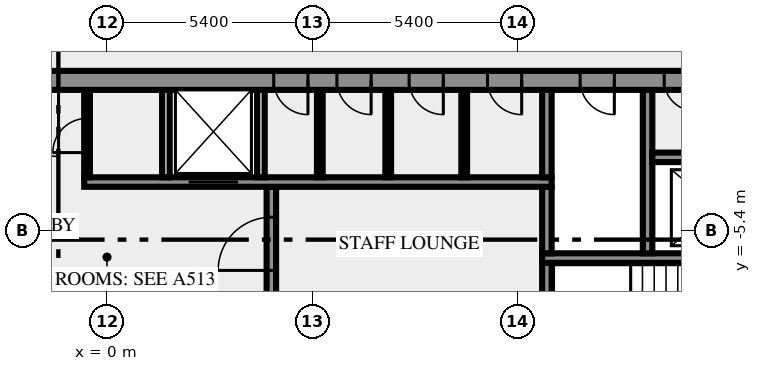
"""IFC4 building model, lengths in metres.
Left out: names, types, materials, properties, quantities, classifications, styles, units other than length and angle.
Written with IfcOpenShell. Run it as: python <this file> out.ifc"""

import sys

from ifc_helpers import new_model, si_unit, direction, frame, frame_2d, origin, place, context, subcontext, project, spatial, rectangle, extrude, element, fill, save


model = new_model("IFC4")
c1 = context("Model", 3, precision=1e-05, world=origin(), true_north=direction((0.0, 1.0)))
c2 = subcontext(c1, "Body", "Model", "MODEL_VIEW")
j1 = project(units=[si_unit("LENGTHUNIT", "METRE"), si_unit("PLANEANGLEUNIT", "RADIAN")], contexts=[c1])
p1 = place(None, origin())
s1 = spatial("IfcSite", under=j1, at=p1, CompositionType="ELEMENT")
p2 = place(p1, origin())
s2 = spatial("IfcBuilding", under=s1, at=p2, CompositionType="ELEMENT")
p3 = place(p2, frame((0.0, 0.0, 289.0)))
s3 = spatial("IfcBuildingStorey", under=s2, at=p3, CompositionType="ELEMENT", Elevation=289.0)
p4 = place(p3, frame((4.325, -7.25, 0.0), z_axis=(0.0, 0.0, 1.0), x_axis=(0.0, 1.0, 0.0)))
e1 = element("IfcWall", 1, at=p4, inside=s3, PredefinedType="SHEAR", context=c2, shape_type="SweptSolid", body=[
    extrude(rectangle(XDim=3.0, YDim=0.25, at=frame_2d((1.5, 0.0))), origin(), (0.0, 0.0, 1.0), 3.65),
])
p5 = place(p4, frame((0.8, 0.0, 0.0)))
e2 = element("IfcOpeningElement", 2, at=p5, cuts=e1, PredefinedType="OPENING", context=c2, shape_type="SweptSolid", body=[
    extrude(rectangle(XDim=1.4, YDim=2.1, at=frame_2d((0.7, 1.05))), frame((0.0, 0.135, 0.0), z_axis=(0.0, -1.0, 0.0), x_axis=(1.0, 0.0, 0.0)), (0.0, 0.0, 1.0), 0.27),
])
p6 = place(p3, frame((11.575, -7.25, 0.0), z_axis=(0.0, 0.0, 1.0), x_axis=(0.0, 1.0, 0.0)))
e3 = element("IfcWall", 3, at=p6, inside=s3, PredefinedType="SHEAR", context=c2, shape_type="SweptSolid", body=[
    extrude(rectangle(XDim=1.0, YDim=0.25, at=frame_2d((0.5, 0.0))), origin(), (0.0, 0.0, 1.0), 3.65),
])
p7 = place(p3, frame((19.5, -6.125, 0.0), z_axis=(0.0, 0.0, 1.0), x_axis=(-1.0, 0.0, 0.0)))
e4 = element("IfcWall", 4, at=p7, inside=s3, PredefinedType="SHEAR", context=c2, shape_type="SweptSolid", body=[
    extrude(rectangle(XDim=8.05, YDim=0.25, at=frame_2d((4.025, 0.0))), origin(), (0.0, 0.0, 1.0), 3.65),
])
p8 = place(p7, frame((0.05, 0.0, 0.0)))
e5 = element("IfcOpeningElement", 5, at=p8, cuts=e4, PredefinedType="OPENING", context=c2, shape_type="SweptSolid", body=[
    extrude(rectangle(XDim=1.8, YDim=2.1, at=frame_2d((0.9, 1.05))), frame((0.0, 0.135, 0.0), z_axis=(0.0, -1.0, 0.0), x_axis=(1.0, 0.0, 0.0)), (0.0, 0.0, 1.0), 0.27),
])
p9 = place(p3, frame((11.575, -6.0, 0.0), z_axis=(0.0, 0.0, 1.0), x_axis=(0.0, 1.0, 0.0)))
e6 = element("IfcWall", 6, at=p9, inside=s3, PredefinedType="SHEAR", context=c2, shape_type="SweptSolid", body=[
    extrude(rectangle(XDim=1.75, YDim=0.25, at=frame_2d((0.875, 0.0))), origin(), (0.0, 0.0, 1.0), 3.65),
])
p10 = place(p3, frame((14.225, -6.0, 0.0), z_axis=(0.0, 0.0, 1.0), x_axis=(0.0, 1.0, 0.0)))
e7 = element("IfcWall", 7, at=p10, inside=s3, PredefinedType="SHEAR", context=c2, shape_type="SweptSolid", body=[
    extrude(rectangle(XDim=4.3, YDim=0.25, at=frame_2d((2.15, 0.0))), origin(), (0.0, 0.0, 1.0), 3.65),
])
p11 = place(p3, frame((-0.6, -4.125, 0.0), z_axis=(0.0, 0.0, 1.0), x_axis=(1.0, 0.0, 0.0)))
e8 = element("IfcWall", 8, at=p11, inside=s3, PredefinedType="SHEAR", context=c2, shape_type="SweptSolid", body=[
    extrude(rectangle(XDim=12.3, YDim=0.25, at=frame_2d((6.15, 0.0))), origin(), (0.0, 0.0, 1.0), 3.65),
])
p12 = place(p11, frame((2.75, 0.0, 0.0)))
e9 = element("IfcOpeningElement", 9, at=p12, cuts=e8, PredefinedType="OPENING", context=c2, shape_type="SweptSolid", body=[
    extrude(rectangle(XDim=1.3, YDim=2.1, at=frame_2d((0.65, 1.05))), frame((0.0, 0.135, 0.0), z_axis=(0.0, -1.0, 0.0), x_axis=(1.0, 0.0, 0.0)), (0.0, 0.0, 1.0), 0.27),
])
p13 = place(p3, frame((-0.525, -4.0, 0.0), z_axis=(0.0, 0.0, 1.0), x_axis=(0.0, 1.0, 0.0)))
e10 = element("IfcWall", 10, at=p13, inside=s3, PredefinedType="PARTITIONING", context=c2, shape_type="SweptSolid", body=[
    extrude(rectangle(XDim=2.3, YDim=0.15, at=frame_2d((1.15, 0.0))), origin(), (0.0, 0.0, 1.0), 3.65),
])
p14 = place(p13, frame((0.65, 0.0, 0.0)))
e11 = element("IfcOpeningElement", 11, at=p14, cuts=e10, PredefinedType="OPENING", context=c2, shape_type="SweptSolid", body=[
    extrude(rectangle(XDim=0.9, YDim=2.1, at=frame_2d((0.45, 1.05))), frame((0.0, 0.085, 0.0), z_axis=(0.0, -1.0, 0.0), x_axis=(1.0, 0.0, 0.0)), (0.0, 0.0, 1.0), 0.17),
])
for number, where, z_axis, x_axis in (
    (12, (1.55, -4.0, 0.0), (0.0, 0.0, 1.0), (0.0, 1.0, 0.0)),
    (13, (4.05, -4.0, 0.0), (0.0, 0.0, 1.0), (0.0, 1.0, 0.0)),
):
    element("IfcWall", number, at=place(p3, frame(where, z_axis=z_axis, x_axis=x_axis)), inside=s3, PredefinedType="SOLIDWALL", context=c2, shape_type="SweptSolid", body=[
        extrude(rectangle(XDim=2.3, YDim=0.2, at=frame_2d((1.15, 0.0))), origin(), (0.0, 0.0, 1.0), 3.65),
    ])
for number, where, z_axis, x_axis in (
    (14, (5.6, -4.0, 0.0), (0.0, 0.0, 1.0), (0.0, 1.0, 0.0)),
    (15, (7.4, -4.0, 0.0), (0.0, 0.0, 1.0), (0.0, 1.0, 0.0)),
    (16, (9.4, -4.0, 0.0), (0.0, 0.0, 1.0), (0.0, 1.0, 0.0)),
):
    element("IfcWall", number, at=place(p3, frame(where, z_axis=z_axis, x_axis=x_axis)), inside=s3, PredefinedType="PARTITIONING", context=c2, shape_type="SweptSolid", body=[
        extrude(rectangle(XDim=2.3, YDim=0.15, at=frame_2d((1.15, 0.0))), origin(), (0.0, 0.0, 1.0), 3.65),
    ])
p15 = place(p3, frame((11.575, -4.0, 0.0), z_axis=(0.0, 0.0, 1.0), x_axis=(0.0, 1.0, 0.0)))
e17 = element("IfcWall", 17, at=p15, inside=s3, PredefinedType="SHEAR", context=c2, shape_type="SweptSolid", body=[
    extrude(rectangle(XDim=2.3, YDim=0.25, at=frame_2d((1.15, 0.0))), origin(), (0.0, 0.0, 1.0), 3.65),
])
p16 = place(p3, frame((14.35, -3.475, 0.0), z_axis=(0.0, 0.0, 1.0), x_axis=(1.0, 0.0, 0.0)))
e18 = element("IfcWall", 18, at=p16, inside=s3, PredefinedType="SHEAR", context=c2, shape_type="SweptSolid", body=[
    extrude(rectangle(XDim=3.0, YDim=0.25, at=frame_2d((1.5, 0.0))), origin(), (0.0, 0.0, 1.0), 3.65),
])
p17 = place(p3, frame((20.49, -1.45, 0.0), z_axis=(0.0, 0.0, 1.0), x_axis=(-1.0, 0.0, 0.0)))
e19 = element("IfcWall", 19, at=p17, inside=s3, PredefinedType="SHEAR", context=c2, shape_type="SweptSolid", body=[
    extrude(rectangle(XDim=40.98, YDim=0.5, at=frame_2d((20.49, 0.0))), origin(), (0.0, 0.0, 1.0), 3.65),
])
p18 = place(p17, frame((38.14, 0.0, 0.0)))
e20 = element("IfcOpeningElement", 20, at=p18, cuts=e19, PredefinedType="OPENING", context=c2, shape_type="SweptSolid", body=[
    extrude(rectangle(XDim=1.8, YDim=2.1, at=frame_2d((0.9, 1.05))), frame((0.0, 0.26, 0.0), z_axis=(0.0, -1.0, 0.0), x_axis=(1.0, 0.0, 0.0)), (0.0, 0.0, 1.0), 0.52),
])
p19 = place(p17, frame((35.89, 0.0, 0.0)))
e21 = element("IfcOpeningElement", 21, at=p19, cuts=e19, PredefinedType="OPENING", context=c2, shape_type="SweptSolid", body=[
    extrude(rectangle(XDim=0.9, YDim=2.1, at=frame_2d((0.45, 1.05))), frame((0.0, 0.26, 0.0), z_axis=(0.0, -1.0, 0.0), x_axis=(1.0, 0.0, 0.0)), (0.0, 0.0, 1.0), 0.52),
])
p20 = place(p17, frame((32.94, 0.0, 0.0)))
e22 = element("IfcOpeningElement", 22, at=p20, cuts=e19, PredefinedType="OPENING", context=c2, shape_type="SweptSolid", body=[
    extrude(rectangle(XDim=0.9, YDim=2.1, at=frame_2d((0.45, 1.05))), frame((0.0, 0.26, 0.0), z_axis=(0.0, -1.0, 0.0), x_axis=(1.0, 0.0, 0.0)), (0.0, 0.0, 1.0), 0.52),
])
p21 = place(p17, frame((31.015, 0.0, 0.0)))
e23 = element("IfcOpeningElement", 23, at=p21, cuts=e19, PredefinedType="OPENING", context=c2, shape_type="SweptSolid", body=[
    extrude(rectangle(XDim=0.8, YDim=2.1, at=frame_2d((0.4, 1.05))), frame((0.0, 0.26, 0.0), z_axis=(0.0, -1.0, 0.0), x_axis=(1.0, 0.0, 0.0)), (0.0, 0.0, 1.0), 0.52),
])
p22 = place(p17, frame((24.765, 0.0, 0.0)))
e24 = element("IfcOpeningElement", 24, at=p22, cuts=e19, PredefinedType="OPENING", context=c2, shape_type="SweptSolid", body=[
    extrude(rectangle(XDim=0.8, YDim=2.1, at=frame_2d((0.4, 1.05))), frame((0.0, 0.26, 0.0), z_axis=(0.0, -1.0, 0.0), x_axis=(1.0, 0.0, 0.0)), (0.0, 0.0, 1.0), 0.52),
])
p23 = place(p17, frame((21.765, 0.0, 0.0)))
e25 = element("IfcOpeningElement", 25, at=p23, cuts=e19, PredefinedType="OPENING", context=c2, shape_type="SweptSolid", body=[
    extrude(rectangle(XDim=2.0, YDim=2.1, at=frame_2d((1.0, 1.05))), frame((0.0, 0.26, 0.0), z_axis=(0.0, -1.0, 0.0), x_axis=(1.0, 0.0, 0.0)), (0.0, 0.0, 1.0), 0.52),
])
p24 = place(p17, frame((15.202, 0.0, 0.0)))
e26 = element("IfcOpeningElement", 26, at=p24, cuts=e19, PredefinedType="OPENING", context=c2, shape_type="SweptSolid", body=[
    extrude(rectangle(XDim=0.9, YDim=2.1, at=frame_2d((0.45, 1.05))), frame((0.0, 0.26, 0.0), z_axis=(0.0, -1.0, 0.0), x_axis=(1.0, 0.0, 0.0)), (0.0, 0.0, 1.0), 0.52),
])
p25 = place(p17, frame((13.54, 0.0, 0.0)))
e27 = element("IfcOpeningElement", 27, at=p25, cuts=e19, PredefinedType="OPENING", context=c2, shape_type="SweptSolid", body=[
    extrude(rectangle(XDim=0.9, YDim=2.1, at=frame_2d((0.45, 1.05))), frame((0.0, 0.26, 0.0), z_axis=(0.0, -1.0, 0.0), x_axis=(1.0, 0.0, 0.0)), (0.0, 0.0, 1.0), 0.52),
])
p26 = place(p17, frame((11.64, 0.0, 0.0)))
e28 = element("IfcOpeningElement", 28, at=p26, cuts=e19, PredefinedType="OPENING", context=c2, shape_type="SweptSolid", body=[
    extrude(rectangle(XDim=0.9, YDim=2.1, at=frame_2d((0.45, 1.05))), frame((0.0, 0.26, 0.0), z_axis=(0.0, -1.0, 0.0), x_axis=(1.0, 0.0, 0.0)), (0.0, 0.0, 1.0), 0.52),
])
p27 = place(p17, frame((9.577, 0.0, 0.0)))
e29 = element("IfcOpeningElement", 29, at=p27, cuts=e19, PredefinedType="OPENING", context=c2, shape_type="SweptSolid", body=[
    extrude(rectangle(XDim=0.9, YDim=2.1, at=frame_2d((0.45, 1.05))), frame((0.0, 0.26, 0.0), z_axis=(0.0, -1.0, 0.0), x_axis=(1.0, 0.0, 0.0)), (0.0, 0.0, 1.0), 0.52),
])
p28 = place(p17, frame((7.14, 0.0, 0.0)))
e30 = element("IfcOpeningElement", 30, at=p28, cuts=e19, PredefinedType="OPENING", context=c2, shape_type="SweptSolid", body=[
    extrude(rectangle(XDim=0.9, YDim=2.1, at=frame_2d((0.45, 1.05))), frame((0.0, 0.26, 0.0), z_axis=(0.0, -1.0, 0.0), x_axis=(1.0, 0.0, 0.0)), (0.0, 0.0, 1.0), 0.52),
])
p29 = place(p17, frame((5.028, 0.0, 0.0)))
e31 = element("IfcOpeningElement", 31, at=p29, cuts=e19, PredefinedType="OPENING", context=c2, shape_type="SweptSolid", body=[
    extrude(rectangle(XDim=0.8, YDim=2.1, at=frame_2d((0.4, 1.05))), frame((0.0, 0.26, 0.0), z_axis=(0.0, -1.0, 0.0), x_axis=(1.0, 0.0, 0.0)), (0.0, 0.0, 1.0), 0.52),
])
p30 = place(p17, frame((3.452, 0.0, 0.0)))
e32 = element("IfcOpeningElement", 32, at=p30, cuts=e19, PredefinedType="OPENING", context=c2, shape_type="SweptSolid", body=[
    extrude(rectangle(XDim=0.8, YDim=2.1, at=frame_2d((0.4, 1.05))), frame((0.0, 0.26, 0.0), z_axis=(0.0, -1.0, 0.0), x_axis=(1.0, 0.0, 0.0)), (0.0, 0.0, 1.0), 0.52),
])
p31 = place(p17, frame((1.04, 0.0, 0.0)))
e33 = element("IfcOpeningElement", 33, at=p31, cuts=e19, PredefinedType="OPENING", context=c2, shape_type="SweptSolid", body=[
    extrude(rectangle(XDim=1.8, YDim=2.1, at=frame_2d((0.9, 1.05))), frame((0.0, 0.26, 0.0), z_axis=(0.0, -1.0, 0.0), x_axis=(1.0, 0.0, 0.0)), (0.0, 0.0, 1.0), 0.52),
])
p32 = place(p5, origin())
e34 = element("IfcDoor", 34, at=p32, inside=s3, OperationType="DOUBLE_DOOR_SINGLE_SWING", PredefinedType="DOOR", context=c2, shape_type="SweptSolid", body=[
    extrude(rectangle(XDim=1.4, YDim=2.1, at=frame_2d((0.7, 1.05))), frame((0.0, 0.025, 0.0), z_axis=(0.0, -1.0, 0.0), x_axis=(1.0, 0.0, 0.0)), (0.0, 0.0, 1.0), 0.05),
])
fill(e2, e34)
p33 = place(p12, origin())
e35 = element("IfcDoor", 35, at=p33, inside=s3, OperationType="DOUBLE_DOOR_SLIDING", PredefinedType="DOOR", context=c2, shape_type="SweptSolid", body=[
    extrude(rectangle(XDim=1.3, YDim=2.1, at=frame_2d((0.65, 1.05))), frame((0.0, 0.025, 0.0), z_axis=(0.0, -1.0, 0.0), x_axis=(1.0, 0.0, 0.0)), (0.0, 0.0, 1.0), 0.05),
])
fill(e9, e35)
p34 = place(p14, origin())
e36 = element("IfcDoor", 36, at=p34, inside=s3, OperationType="SINGLE_SWING_LEFT", PredefinedType="DOOR", context=c2, shape_type="SweptSolid", body=[
    extrude(rectangle(XDim=0.9, YDim=2.1, at=frame_2d((0.45, 1.05))), frame((0.0, 0.025, 0.0), z_axis=(0.0, -1.0, 0.0), x_axis=(1.0, 0.0, 0.0)), (0.0, 0.0, 1.0), 0.05),
])
fill(e11, e36)
p35 = place(p23, origin())
e37 = element("IfcDoor", 37, at=p35, inside=s3, OperationType="DOUBLE_DOOR_SINGLE_SWING", PredefinedType="DOOR", context=c2, shape_type="SweptSolid", body=[
    extrude(rectangle(XDim=2.0, YDim=2.1, at=frame_2d((1.0, 1.05))), frame((0.0, 0.025, 0.0), z_axis=(0.0, -1.0, 0.0), x_axis=(1.0, 0.0, 0.0)), (0.0, 0.0, 1.0), 0.05),
])
fill(e25, e37)
p36 = place(p24, origin())
e38 = element("IfcDoor", 38, at=p36, inside=s3, OperationType="SINGLE_SWING_LEFT", PredefinedType="DOOR", context=c2, shape_type="SweptSolid", body=[
    extrude(rectangle(XDim=0.9, YDim=2.1, at=frame_2d((0.45, 1.05))), frame((0.0, 0.025, 0.0), z_axis=(0.0, -1.0, 0.0), x_axis=(1.0, 0.0, 0.0)), (0.0, 0.0, 1.0), 0.05),
])
fill(e26, e38)
p37 = place(p25, origin())
e39 = element("IfcDoor", 39, at=p37, inside=s3, OperationType="SINGLE_SWING_LEFT", PredefinedType="DOOR", context=c2, shape_type="SweptSolid", body=[
    extrude(rectangle(XDim=0.9, YDim=2.1, at=frame_2d((0.45, 1.05))), frame((0.0, 0.025, 0.0), z_axis=(0.0, -1.0, 0.0), x_axis=(1.0, 0.0, 0.0)), (0.0, 0.0, 1.0), 0.05),
])
fill(e27, e39)
p38 = place(p26, origin())
e40 = element("IfcDoor", 40, at=p38, inside=s3, OperationType="SINGLE_SWING_LEFT", PredefinedType="DOOR", context=c2, shape_type="SweptSolid", body=[
    extrude(rectangle(XDim=0.9, YDim=2.1, at=frame_2d((0.45, 1.05))), frame((0.0, 0.025, 0.0), z_axis=(0.0, -1.0, 0.0), x_axis=(1.0, 0.0, 0.0)), (0.0, 0.0, 1.0), 0.05),
])
fill(e28, e40)
p39 = place(p27, origin())
e41 = element("IfcDoor", 41, at=p39, inside=s3, OperationType="SINGLE_SWING_LEFT", PredefinedType="DOOR", context=c2, shape_type="SweptSolid", body=[
    extrude(rectangle(XDim=0.9, YDim=2.1, at=frame_2d((0.45, 1.05))), frame((0.0, 0.025, 0.0), z_axis=(0.0, -1.0, 0.0), x_axis=(1.0, 0.0, 0.0)), (0.0, 0.0, 1.0), 0.05),
])
fill(e29, e41)
p40 = place(p28, origin())
e42 = element("IfcDoor", 42, at=p40, inside=s3, OperationType="SINGLE_SWING_LEFT", PredefinedType="DOOR", context=c2, shape_type="SweptSolid", body=[
    extrude(rectangle(XDim=0.9, YDim=2.1, at=frame_2d((0.45, 1.05))), frame((0.0, 0.025, 0.0), z_axis=(0.0, -1.0, 0.0), x_axis=(1.0, 0.0, 0.0)), (0.0, 0.0, 1.0), 0.05),
])
fill(e30, e42)
p41 = place(p29, origin())
e43 = element("IfcDoor", 43, at=p41, inside=s3, OperationType="SINGLE_SWING_LEFT", PredefinedType="DOOR", context=c2, shape_type="SweptSolid", body=[
    extrude(rectangle(XDim=0.8, YDim=2.1, at=frame_2d((0.4, 1.05))), frame((0.0, 0.025, 0.0), z_axis=(0.0, -1.0, 0.0), x_axis=(1.0, 0.0, 0.0)), (0.0, 0.0, 1.0), 0.05),
])
fill(e31, e43)
save(model, sys.argv[1])
